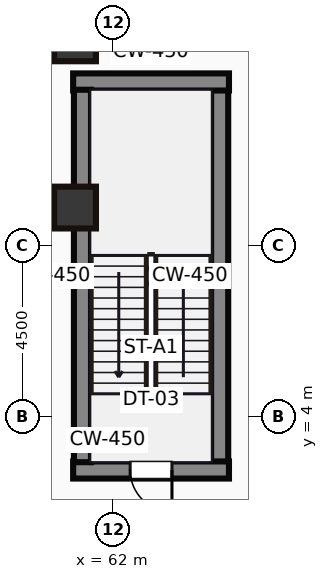
"""IFC4 building model, lengths in metres.
Left out: names, types, materials, properties, quantities, classifications, styles, units other than length and angle.
Written with IfcOpenShell. Run it as: python <this file> out.ifc"""

import sys

from ifc_helpers import new_model, si_unit, direction, frame, frame_2d, origin, origin_2d, place, context, subcontext, project, spatial, rectangle, hollow_rectangle, extrude, source, transform, mapped, element, fill, save


model = new_model("IFC4")
c1 = context("Model", 3, precision=1e-05, world=origin(), true_north=direction((0.0, 1.0)))
c2 = subcontext(c1, "Body", "Model", "MODEL_VIEW")
j1 = project(units=[si_unit("LENGTHUNIT", "METRE"), si_unit("PLANEANGLEUNIT", "RADIAN")], contexts=[c1])
p1 = place(None, origin())
s1 = spatial("IfcSite", under=j1, at=p1, CompositionType="ELEMENT")
p2 = place(p1, origin())
s2 = spatial("IfcBuilding", under=s1, at=p2, CompositionType="ELEMENT")
p3 = place(p2, frame((0.0, 0.0, 6.0)))
s3 = spatial("IfcBuildingStorey", under=s2, at=p3, CompositionType="ELEMENT", Elevation=6.0)
m1 = source(origin(), c2, "Body", "SweptSolid", [
    extrude(hollow_rectangle(XDim=1.1, YDim=1.3, WallThickness=0.055, at=origin_2d()), origin(), (0.0, 0.0, 1.0), 5.0),
])
p4 = place(p3, frame((61.0, 14.0, 0.0), z_axis=(0.0, 0.0, 1.0), x_axis=(1.0, 0.0, 0.0)))
e1 = element("IfcColumn", 1, at=p4, inside=s3, PredefinedType="PILASTER", context=c2, shape_type="MappedRepresentation", body=[
    mapped(m1, transform((0.0, 0.0, 0.0))),
])
m2 = source(origin(), c2, "Body", "SweptSolid", [
    extrude(hollow_rectangle(XDim=1.1, YDim=1.1, WallThickness=0.05, at=origin_2d()), origin(), (0.0, 0.0, 1.0), 5.0),
])
p5 = place(p3, frame((61.0, 9.5, 0.0), z_axis=(0.0, 0.0, 1.0), x_axis=(1.0, 0.0, 0.0)))
e2 = element("IfcColumn", 2, at=p5, inside=s3, PredefinedType="PILASTER", context=c2, shape_type="MappedRepresentation", body=[
    mapped(m2, transform((0.0, 0.0, 0.0))),
])
m3 = source(origin(), c2, "Body", "SweptSolid", [
    extrude(rectangle(XDim=4.1, YDim=0.45, at=frame_2d((2.05, 0.0))), origin(), (0.0, 0.0, 1.0), 5.0),
])
p6 = place(p3, frame((60.95, 2.595, 0.0), z_axis=(0.0, 0.0, 1.0), x_axis=(1.0, 0.0, 0.0)))
e3 = element("IfcWall", 3, at=p6, inside=s3, PredefinedType="SHEAR", context=c2, shape_type="MappedRepresentation", body=[
    mapped(m3, transform((0.0, 0.0, 0.0))),
])
p7 = place(p6, frame((1.5, 0.0, 0.0)))
e4 = element("IfcOpeningElement", 4, at=p7, cuts=e3, PredefinedType="OPENING", context=c2, shape_type="SweptSolid", body=[
    extrude(rectangle(XDim=1.1, YDim=2.15, at=frame_2d((0.55, 1.075))), frame((0.0, 0.235, 0.0), z_axis=(0.0, -1.0, 0.0), x_axis=(1.0, 0.0, 0.0)), (0.0, 0.0, 1.0), 0.47),
])
m4 = source(origin(), c2, "Body", "SweptSolid", [
    extrude(rectangle(XDim=9.8, YDim=0.45, at=frame_2d((4.9, 0.0))), origin(), (0.0, 0.0, 1.0), 5.0),
])
for number, where, z_axis, x_axis in (
    (5, (61.195, 2.8, 0.0), (0.0, 0.0, 1.0), (0.0, 1.0, 0.0)),
    (6, (64.805, 2.8, 0.0), (0.0, 0.0, 1.0), (0.0, 1.0, 0.0)),
):
    element("IfcWall", number, at=place(p3, frame(where, z_axis=z_axis, x_axis=x_axis)), inside=s3, PredefinedType="SHEAR", context=c2, shape_type="MappedRepresentation", body=[
        mapped(m4, transform((0.0, 0.0, 0.0))),
    ])
p8 = place(p3, frame((60.95, 12.805, 0.0), z_axis=(0.0, 0.0, 1.0), x_axis=(1.0, 0.0, 0.0)))
e7 = element("IfcWall", 7, at=p8, inside=s3, PredefinedType="SHEAR", context=c2, shape_type="MappedRepresentation", body=[
    mapped(m3, transform((0.0, 0.0, 0.0))),
])
m5 = source(origin(), c2, "Body", "SweptSolid", [
    extrude(rectangle(XDim=1.1, YDim=2.15, at=frame_2d((0.55, 1.075))), frame((0.0, 0.025, 0.0), z_axis=(0.0, -1.0, 0.0), x_axis=(1.0, 0.0, 0.0)), (0.0, 0.0, 1.0), 0.05),
])
p9 = place(p7, origin())
e8 = element("IfcDoor", 8, at=p9, inside=s3, OperationType="SINGLE_SWING_RIGHT", PredefinedType="DOOR", context=c2, shape_type="MappedRepresentation", body=[
    mapped(m5, transform((0.0, 0.0, 0.0))),
])
fill(e4, e8)
save(model, sys.argv[1])
